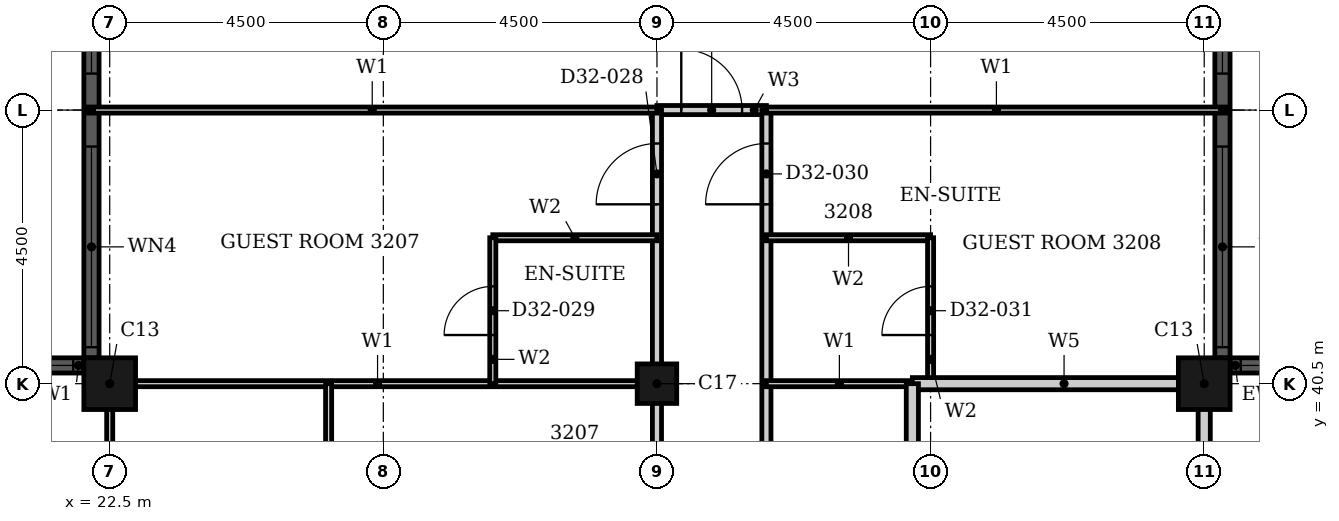
"""IFC4 building model, lengths in metres.
Left out: names, types, materials, properties, quantities, classifications, styles, units other than length and angle.
Written with IfcOpenShell. Run it as: python <this file> out.ifc"""

import sys

from ifc_helpers import new_model, si_unit, direction, frame, frame_2d, origin, origin_2d, place, context, subcontext, project, spatial, rectangle, hollow_rectangle, extrude, element, fill, save


model = new_model("IFC4")
c1 = context("Model", 3, precision=1e-05, world=origin(), true_north=direction((0.0, 1.0)))
c2 = subcontext(c1, "Body", "Model", "MODEL_VIEW")
j1 = project(units=[si_unit("LENGTHUNIT", "METRE"), si_unit("PLANEANGLEUNIT", "RADIAN")], contexts=[c1])
p1 = place(None, origin())
s1 = spatial("IfcSite", under=j1, at=p1, CompositionType="ELEMENT")
p2 = place(p1, origin())
s2 = spatial("IfcBuilding", under=s1, at=p2, CompositionType="ELEMENT")
p3 = place(p2, frame((0.0, 0.0, 129.6)))
s3 = spatial("IfcBuildingStorey", under=s2, at=p3, CompositionType="ELEMENT", Elevation=129.6)
for number, where, z_axis, x_axis in (
    (1, (40.5, 40.5, 0.0), (0.0, 0.0, 1.0), (1.0, 0.0, 0.0)),
    (2, (22.5, 40.5, 0.0), (0.0, 0.0, 1.0), (1.0, 0.0, 0.0)),
):
    element("IfcColumn", number, at=place(p3, frame(where, z_axis=z_axis, x_axis=x_axis)), inside=s3, PredefinedType="COLUMN", context=c2, shape_type="SweptSolid", body=[
        extrude(hollow_rectangle(XDim=0.85, YDim=0.85, WallThickness=0.026, at=origin_2d()), origin(), (0.0, 0.0, 1.0), 3.6),
    ])
p4 = place(p3, frame((31.5, 40.5, 0.0), z_axis=(0.0, 0.0, 1.0), x_axis=(1.0, 0.0, 0.0)))
e3 = element("IfcColumn", 3, at=p4, inside=s3, PredefinedType="COLUMN", context=c2, shape_type="SweptSolid", body=[
    extrude(hollow_rectangle(XDim=0.65, YDim=0.65, WallThickness=0.021, at=origin_2d()), origin(), (0.0, 0.0, 1.0), 3.6),
])
p5 = place(p3, frame((44.575, 40.8, 0.0), z_axis=(0.0, 0.0, 1.0), x_axis=(-1.0, 0.0, 0.0)))
e4 = element("IfcWall", 4, at=p5, inside=s3, PredefinedType="SOLIDWALL", context=c2, shape_type="SweptSolid", body=[
    extrude(rectangle(XDim=3.65, YDim=0.25, at=frame_2d((1.825, 0.0))), origin(), (0.0, 0.0, 1.0), 3.6),
])
p6 = place(p5, frame((0.175, 0.0, 0.9)))
e5 = element("IfcOpeningElement", 5, at=p6, cuts=e4, PredefinedType="OPENING", context=c2, shape_type="SweptSolid", body=[
    extrude(rectangle(XDim=3.3, YDim=2.08, at=frame_2d((1.65, 1.04))), frame((0.0, 0.135, 0.0), z_axis=(0.0, -1.0, 0.0), x_axis=(1.0, 0.0, 0.0)), (0.0, 0.0, 1.0), 0.27),
])
p7 = place(p3, frame((40.8, 40.925, 0.0), z_axis=(0.0, 0.0, 1.0), x_axis=(0.0, 1.0, 0.0)))
e6 = element("IfcWall", 6, at=p7, inside=s3, PredefinedType="SOLIDWALL", context=c2, shape_type="SweptSolid", body=[
    extrude(rectangle(XDim=8.15, YDim=0.25, at=frame_2d((4.075, 0.0))), origin(), (0.0, 0.0, 1.0), 3.6),
])
p8 = place(p7, frame((0.175, 0.0, 0.9)))
e7 = element("IfcOpeningElement", 7, at=p8, cuts=e6, PredefinedType="OPENING", context=c2, shape_type="SweptSolid", body=[
    extrude(rectangle(XDim=3.3, YDim=2.08, at=frame_2d((1.65, 1.04))), frame((0.0, 0.135, 0.0), z_axis=(0.0, -1.0, 0.0), x_axis=(1.0, 0.0, 0.0)), (0.0, 0.0, 1.0), 0.27),
])
p9 = place(p7, frame((4.675, 0.0, 0.9)))
e8 = element("IfcOpeningElement", 8, at=p9, cuts=e6, PredefinedType="OPENING", context=c2, shape_type="SweptSolid", body=[
    extrude(rectangle(XDim=3.3, YDim=2.08, at=frame_2d((1.65, 1.04))), frame((0.0, 0.135, 0.0), z_axis=(0.0, -1.0, 0.0), x_axis=(1.0, 0.0, 0.0)), (0.0, 0.0, 1.0), 0.27),
])
p10 = place(p3, frame((22.2, 49.075, 0.0), z_axis=(0.0, 0.0, 1.0), x_axis=(0.0, -1.0, 0.0)))
e9 = element("IfcWall", 9, at=p10, inside=s3, PredefinedType="SOLIDWALL", context=c2, shape_type="SweptSolid", body=[
    extrude(rectangle(XDim=8.15, YDim=0.25, at=frame_2d((4.075, 0.0))), origin(), (0.0, 0.0, 1.0), 3.6),
])
p11 = place(p10, frame((0.175, 0.0, 0.9)))
e10 = element("IfcOpeningElement", 10, at=p11, cuts=e9, PredefinedType="OPENING", context=c2, shape_type="SweptSolid", body=[
    extrude(rectangle(XDim=3.3, YDim=2.08, at=frame_2d((1.65, 1.04))), frame((0.0, 0.135, 0.0), z_axis=(0.0, -1.0, 0.0), x_axis=(1.0, 0.0, 0.0)), (0.0, 0.0, 1.0), 0.27),
])
p12 = place(p10, frame((4.675, 0.0, 0.9)))
e11 = element("IfcOpeningElement", 11, at=p12, cuts=e9, PredefinedType="OPENING", context=c2, shape_type="SweptSolid", body=[
    extrude(rectangle(XDim=3.3, YDim=2.08, at=frame_2d((1.65, 1.04))), frame((0.0, 0.135, 0.0), z_axis=(0.0, -1.0, 0.0), x_axis=(1.0, 0.0, 0.0)), (0.0, 0.0, 1.0), 0.27),
])
p13 = place(p3, frame((22.075, 40.8, 0.0), z_axis=(0.0, 0.0, 1.0), x_axis=(-1.0, 0.0, 0.0)))
e12 = element("IfcWall", 12, at=p13, inside=s3, PredefinedType="SOLIDWALL", context=c2, shape_type="SweptSolid", body=[
    extrude(rectangle(XDim=3.65, YDim=0.25, at=frame_2d((1.825, 0.0))), origin(), (0.0, 0.0, 1.0), 3.6),
])
p14 = place(p13, frame((0.175, 0.0, 0.9)))
e13 = element("IfcOpeningElement", 13, at=p14, cuts=e12, PredefinedType="OPENING", context=c2, shape_type="SweptSolid", body=[
    extrude(rectangle(XDim=3.3, YDim=2.08, at=frame_2d((1.65, 1.04))), frame((0.0, 0.135, 0.0), z_axis=(0.0, -1.0, 0.0), x_axis=(1.0, 0.0, 0.0)), (0.0, 0.0, 1.0), 0.27),
])
p15 = place(p3, frame((31.5, 45.0, 0.0), z_axis=(0.0, 0.0, 1.0), x_axis=(1.0, 0.0, 0.0)))
e14 = element("IfcWall", 14, at=p15, inside=s3, PredefinedType="PARTITIONING", context=c2, shape_type="SweptSolid", body=[
    extrude(rectangle(XDim=1.8, YDim=0.15, at=frame_2d((0.9, 0.0))), origin(), (0.0, 0.0, 1.0), 3.3),
])
p16 = place(p15, frame((0.4, 0.0, 0.0)))
e15 = element("IfcOpeningElement", 15, at=p16, cuts=e14, PredefinedType="OPENING", context=c2, shape_type="SweptSolid", body=[
    extrude(rectangle(XDim=1.0, YDim=2.1, at=frame_2d((0.5, 1.05))), frame((0.0, 0.085, 0.0), z_axis=(0.0, -1.0, 0.0), x_axis=(1.0, 0.0, 0.0)), (0.0, 0.0, 1.0), 0.17),
])
p17 = place(p3, frame((31.5, 33.3, 0.0), z_axis=(0.0, 0.0, 1.0), x_axis=(0.0, 1.0, 0.0)))
e16 = element("IfcWall", 16, at=p17, inside=s3, PredefinedType="PARTITIONING", context=c2, shape_type="SweptSolid", body=[
    extrude(rectangle(XDim=11.7, YDim=0.15, at=frame_2d((5.85, 0.0))), origin(), (0.0, 0.0, 1.0), 2.58),
])
p18 = place(p17, frame((10.15, 0.0, 0.0)))
e17 = element("IfcOpeningElement", 17, at=p18, cuts=e16, PredefinedType="OPENING", context=c2, shape_type="SweptSolid", body=[
    extrude(rectangle(XDim=1.0, YDim=2.1, at=frame_2d((0.5, 1.05))), frame((0.0, 0.085, 0.0), z_axis=(0.0, -1.0, 0.0), x_axis=(1.0, 0.0, 0.0)), (0.0, 0.0, 1.0), 0.17),
])
p19 = place(p3, frame((33.3, 33.3, 0.0), z_axis=(0.0, 0.0, 1.0), x_axis=(0.0, 1.0, 0.0)))
e18 = element("IfcWall", 18, at=p19, inside=s3, PredefinedType="PARTITIONING", context=c2, shape_type="SweptSolid", body=[
    extrude(rectangle(XDim=11.7, YDim=0.15, at=frame_2d((5.85, 0.0))), origin(), (0.0, 0.0, 1.0), 3.3),
])
p20 = place(p19, frame((10.15, 0.0, 0.0)))
e19 = element("IfcOpeningElement", 19, at=p20, cuts=e18, PredefinedType="OPENING", context=c2, shape_type="SweptSolid", body=[
    extrude(rectangle(XDim=1.0, YDim=2.1, at=frame_2d((0.5, 1.05))), frame((0.0, 0.085, 0.0), z_axis=(0.0, -1.0, 0.0), x_axis=(1.0, 0.0, 0.0)), (0.0, 0.0, 1.0), 0.17),
])
p21 = place(p3, frame((33.3, 40.5, 0.0), z_axis=(0.0, 0.0, 1.0), x_axis=(1.0, 0.0, 0.0)))
e20 = element("IfcWall", 20, at=p21, inside=s3, PredefinedType="PARTITIONING", context=c2, shape_type="SweptSolid", body=[
    extrude(rectangle(XDim=2.4, YDim=0.1, at=frame_2d((1.2, 0.0))), origin(), (0.0, 0.0, 1.0), 2.38),
])
p22 = place(p3, frame((22.31, 40.5, 0.0), z_axis=(0.0, 0.0, 1.0), x_axis=(1.0, 0.0, 0.0)))
e21 = element("IfcWall", 21, at=p22, inside=s3, PredefinedType="PARTITIONING", context=c2, shape_type="SweptSolid", body=[
    extrude(rectangle(XDim=9.19, YDim=0.1, at=frame_2d((4.595, 0.0))), origin(), (0.0, 0.0, 1.0), 2.38),
])
p23 = place(p3, frame((33.3, 45.0, 0.0), z_axis=(0.0, 0.0, 1.0), x_axis=(1.0, 0.0, 0.0)))
e22 = element("IfcWall", 22, at=p23, inside=s3, PredefinedType="PARTITIONING", context=c2, shape_type="SweptSolid", body=[
    extrude(rectangle(XDim=7.565, YDim=0.1, at=frame_2d((3.782, 0.0))), origin(), (0.0, 0.0, 1.0), 3.3),
])
p24 = place(p3, frame((22.135, 45.0, 0.0), z_axis=(0.0, 0.0, 1.0), x_axis=(1.0, 0.0, 0.0)))
e23 = element("IfcWall", 23, at=p24, inside=s3, PredefinedType="PARTITIONING", context=c2, shape_type="SweptSolid", body=[
    extrude(rectangle(XDim=9.365, YDim=0.1, at=frame_2d((4.683, 0.0))), origin(), (0.0, 0.0, 1.0), 3.3),
])
p25 = place(p3, frame((22.5, 33.3, 0.0), z_axis=(0.0, 0.0, 1.0), x_axis=(0.0, 1.0, 0.0)))
e24 = element("IfcWall", 24, at=p25, inside=s3, PredefinedType="PARTITIONING", context=c2, shape_type="SweptSolid", body=[
    extrude(rectangle(XDim=7.39, YDim=0.1, at=frame_2d((3.695, 0.0))), origin(), (0.0, 0.0, 1.0), 3.3),
])
p26 = place(p3, frame((26.1, 33.3, 0.0), z_axis=(0.0, 0.0, 1.0), x_axis=(0.0, 1.0, 0.0)))
e25 = element("IfcWall", 25, at=p26, inside=s3, PredefinedType="PARTITIONING", context=c2, shape_type="SweptSolid", body=[
    extrude(rectangle(XDim=7.2, YDim=0.1, at=frame_2d((3.6, 0.0))), origin(), (0.0, 0.0, 1.0), 3.3),
])
for number, where, z_axis, x_axis in (
    (26, (33.3, 42.9, 0.0), (0.0, 0.0, 1.0), (1.0, 0.0, 0.0)),
    (27, (28.8, 42.9, 0.0), (0.0, 0.0, 1.0), (1.0, 0.0, 0.0)),
):
    element("IfcWall", number, at=place(p3, frame(where, z_axis=z_axis, x_axis=x_axis)), inside=s3, PredefinedType="PARTITIONING", context=c2, shape_type="SweptSolid", body=[
        extrude(rectangle(XDim=2.7, YDim=0.1, at=frame_2d((1.35, 0.0))), origin(), (0.0, 0.0, 1.0), 3.3),
    ])
p27 = place(p3, frame((28.8, 40.5, 0.0), z_axis=(0.0, 0.0, 1.0), x_axis=(0.0, 1.0, 0.0)))
e28 = element("IfcWall", 28, at=p27, inside=s3, PredefinedType="PARTITIONING", context=c2, shape_type="SweptSolid", body=[
    extrude(rectangle(XDim=2.4, YDim=0.1, at=frame_2d((1.2, 0.0))), origin(), (0.0, 0.0, 1.0), 3.3),
])
p28 = place(p27, frame((0.8, 0.0, 0.0)))
e29 = element("IfcOpeningElement", 29, at=p28, cuts=e28, PredefinedType="OPENING", context=c2, shape_type="SweptSolid", body=[
    extrude(rectangle(XDim=0.8, YDim=2.1, at=frame_2d((0.4, 1.05))), frame((0.0, 0.06, 0.0), z_axis=(0.0, -1.0, 0.0), x_axis=(1.0, 0.0, 0.0)), (0.0, 0.0, 1.0), 0.12),
])
p29 = place(p3, frame((36.0, 40.5, 0.0), z_axis=(0.0, 0.0, 1.0), x_axis=(0.0, 1.0, 0.0)))
e30 = element("IfcWall", 30, at=p29, inside=s3, PredefinedType="PARTITIONING", context=c2, shape_type="SweptSolid", body=[
    extrude(rectangle(XDim=2.4, YDim=0.1, at=frame_2d((1.2, 0.0))), origin(), (0.0, 0.0, 1.0), 2.58),
])
p30 = place(p29, frame((0.8, 0.0, 0.0)))
e31 = element("IfcOpeningElement", 31, at=p30, cuts=e30, PredefinedType="OPENING", context=c2, shape_type="SweptSolid", body=[
    extrude(rectangle(XDim=0.8, YDim=2.1, at=frame_2d((0.4, 1.05))), frame((0.0, 0.06, 0.0), z_axis=(0.0, -1.0, 0.0), x_axis=(1.0, 0.0, 0.0)), (0.0, 0.0, 1.0), 0.12),
])
p31 = place(p3, frame((35.7, 40.5, 0.0), z_axis=(0.0, 0.0, 1.0), x_axis=(1.0, 0.0, 0.0)))
e32 = element("IfcWall", 32, at=p31, inside=s3, PredefinedType="PARTITIONING", context=c2, shape_type="SweptSolid", body=[
    extrude(rectangle(XDim=4.99, YDim=0.2, at=frame_2d((2.495, 0.0))), origin(), (0.0, 0.0, 1.0), 2.38),
])
p32 = place(p3, frame((35.7, 33.3, 0.0), z_axis=(0.0, 0.0, 1.0), x_axis=(0.0, 1.0, 0.0)))
e33 = element("IfcWall", 33, at=p32, inside=s3, PredefinedType="PARTITIONING", context=c2, shape_type="SweptSolid", body=[
    extrude(rectangle(XDim=7.2, YDim=0.2, at=frame_2d((3.6, 0.0))), origin(), (0.0, 0.0, 1.0), 3.3),
])
p33 = place(p3, frame((40.5, 33.3, 0.0), z_axis=(0.0, 0.0, 1.0), x_axis=(0.0, 1.0, 0.0)))
e34 = element("IfcWall", 34, at=p33, inside=s3, PredefinedType="PARTITIONING", context=c2, shape_type="SweptSolid", body=[
    extrude(rectangle(XDim=7.39, YDim=0.2, at=frame_2d((3.695, 0.0))), origin(), (0.0, 0.0, 1.0), 3.3),
])
p34 = place(p6, origin())
e35 = element("IfcWindow", 35, at=p34, inside=s3, PartitioningType="SINGLE_PANEL", PredefinedType="WINDOW", context=c2, shape_type="SweptSolid", body=[
    extrude(rectangle(XDim=3.3, YDim=2.08, at=frame_2d((1.65, 1.04))), frame((0.0, 0.03, 0.0), z_axis=(0.0, -1.0, 0.0), x_axis=(1.0, 0.0, 0.0)), (0.0, 0.0, 1.0), 0.06),
])
fill(e5, e35)
p35 = place(p8, origin())
e36 = element("IfcWindow", 36, at=p35, inside=s3, PartitioningType="SINGLE_PANEL", PredefinedType="WINDOW", context=c2, shape_type="SweptSolid", body=[
    extrude(rectangle(XDim=3.3, YDim=2.08, at=frame_2d((1.65, 1.04))), frame((0.0, 0.03, 0.0), z_axis=(0.0, -1.0, 0.0), x_axis=(1.0, 0.0, 0.0)), (0.0, 0.0, 1.0), 0.06),
])
fill(e7, e36)
p36 = place(p9, origin())
e37 = element("IfcWindow", 37, at=p36, inside=s3, PartitioningType="SINGLE_PANEL", PredefinedType="WINDOW", context=c2, shape_type="SweptSolid", body=[
    extrude(rectangle(XDim=3.3, YDim=2.08, at=frame_2d((1.65, 1.04))), frame((0.0, 0.03, 0.0), z_axis=(0.0, -1.0, 0.0), x_axis=(1.0, 0.0, 0.0)), (0.0, 0.0, 1.0), 0.06),
])
fill(e8, e37)
p37 = place(p11, origin())
e38 = element("IfcWindow", 38, at=p37, inside=s3, PartitioningType="SINGLE_PANEL", PredefinedType="WINDOW", context=c2, shape_type="SweptSolid", body=[
    extrude(rectangle(XDim=3.3, YDim=2.08, at=frame_2d((1.65, 1.04))), frame((0.0, 0.03, 0.0), z_axis=(0.0, -1.0, 0.0), x_axis=(1.0, 0.0, 0.0)), (0.0, 0.0, 1.0), 0.06),
])
fill(e10, e38)
p38 = place(p12, origin())
e39 = element("IfcWindow", 39, at=p38, inside=s3, PartitioningType="SINGLE_PANEL", PredefinedType="WINDOW", context=c2, shape_type="SweptSolid", body=[
    extrude(rectangle(XDim=3.3, YDim=2.08, at=frame_2d((1.65, 1.04))), frame((0.0, 0.03, 0.0), z_axis=(0.0, -1.0, 0.0), x_axis=(1.0, 0.0, 0.0)), (0.0, 0.0, 1.0), 0.06),
])
fill(e11, e39)
p39 = place(p14, origin())
e40 = element("IfcWindow", 40, at=p39, inside=s3, PartitioningType="SINGLE_PANEL", PredefinedType="WINDOW", context=c2, shape_type="SweptSolid", body=[
    extrude(rectangle(XDim=3.3, YDim=2.08, at=frame_2d((1.65, 1.04))), frame((0.0, 0.03, 0.0), z_axis=(0.0, -1.0, 0.0), x_axis=(1.0, 0.0, 0.0)), (0.0, 0.0, 1.0), 0.06),
])
fill(e13, e40)
p40 = place(p18, origin())
e41 = element("IfcDoor", 41, at=p40, inside=s3, OperationType="SINGLE_SWING_RIGHT", PredefinedType="DOOR", context=c2, shape_type="SweptSolid", body=[
    extrude(rectangle(XDim=1.0, YDim=2.1, at=frame_2d((0.5, 1.05))), frame((0.0, 0.025, 0.0), z_axis=(0.0, -1.0, 0.0), x_axis=(1.0, 0.0, 0.0)), (0.0, 0.0, 1.0), 0.05),
])
fill(e17, e41)
p41 = place(p28, origin())
e42 = element("IfcDoor", 42, at=p41, inside=s3, OperationType="SINGLE_SWING_RIGHT", PredefinedType="DOOR", context=c2, shape_type="SweptSolid", body=[
    extrude(rectangle(XDim=0.8, YDim=2.1, at=frame_2d((0.4, 1.05))), frame((0.0, 0.025, 0.0), z_axis=(0.0, -1.0, 0.0), x_axis=(1.0, 0.0, 0.0)), (0.0, 0.0, 1.0), 0.05),
])
fill(e29, e42)
p42 = place(p20, origin())
e43 = element("IfcDoor", 43, at=p42, inside=s3, OperationType="SINGLE_SWING_RIGHT", PredefinedType="DOOR", context=c2, shape_type="SweptSolid", body=[
    extrude(rectangle(XDim=1.0, YDim=2.1, at=frame_2d((0.5, 1.05))), frame((0.0, 0.025, 0.0), z_axis=(0.0, -1.0, 0.0), x_axis=(1.0, 0.0, 0.0)), (0.0, 0.0, 1.0), 0.05),
])
fill(e19, e43)
p43 = place(p30, origin())
e44 = element("IfcDoor", 44, at=p43, inside=s3, OperationType="SINGLE_SWING_RIGHT", PredefinedType="DOOR", context=c2, shape_type="SweptSolid", body=[
    extrude(rectangle(XDim=0.8, YDim=2.1, at=frame_2d((0.4, 1.05))), frame((0.0, 0.025, 0.0), z_axis=(0.0, -1.0, 0.0), x_axis=(1.0, 0.0, 0.0)), (0.0, 0.0, 1.0), 0.05),
])
fill(e31, e44)
p44 = place(p16, origin())
e45 = element("IfcDoor", 45, at=p44, inside=s3, OperationType="SINGLE_SWING_LEFT", PredefinedType="DOOR", context=c2, shape_type="SweptSolid", body=[
    extrude(rectangle(XDim=1.0, YDim=2.1, at=frame_2d((0.5, 1.05))), frame((0.0, 0.025, 0.0), z_axis=(0.0, -1.0, 0.0), x_axis=(1.0, 0.0, 0.0)), (0.0, 0.0, 1.0), 0.05),
])
fill(e15, e45)
save(model, sys.argv[1])
